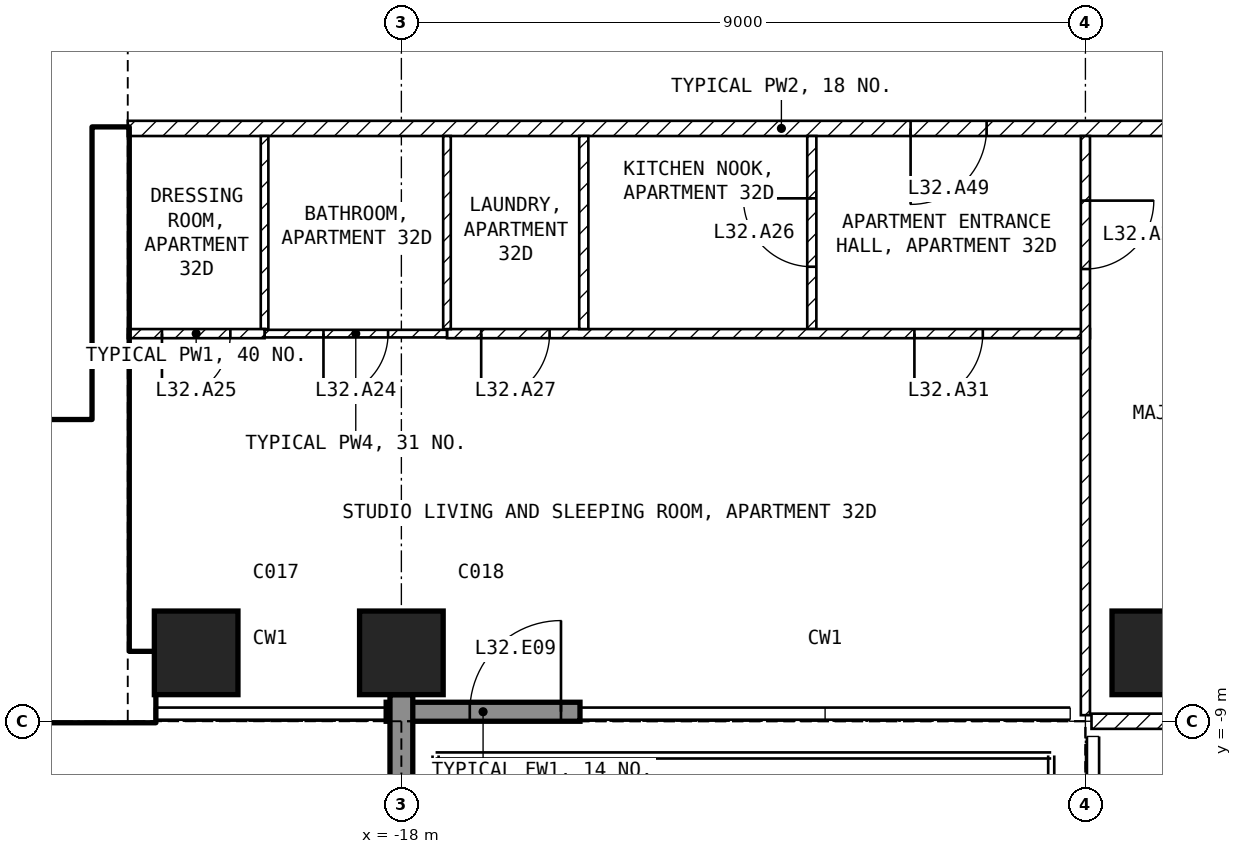
"""IFC4 building model, lengths in metres.
Left out: names, types, materials, properties, quantities, classifications, styles, units other than length and angle.
Written with IfcOpenShell. Run it as: python <this file> out.ifc"""

import sys

from ifc_helpers import new_model, si_unit, direction, frame, frame_2d, origin, origin_2d, place, context, subcontext, project, spatial, rectangle, extrude, element, fill, save


model = new_model("IFC4")
c1 = context("Model", 3, precision=1e-05, world=origin(), true_north=direction((0.0, 1.0)))
c2 = subcontext(c1, "Body", "Model", "MODEL_VIEW")
j1 = project(units=[si_unit("LENGTHUNIT", "METRE"), si_unit("PLANEANGLEUNIT", "RADIAN")], contexts=[c1])
p1 = place(None, origin())
s1 = spatial("IfcSite", under=j1, at=p1, CompositionType="ELEMENT")
p2 = place(p1, origin())
s2 = spatial("IfcBuilding", under=s1, at=p2, CompositionType="ELEMENT")
p3 = place(p2, frame((0.0, 0.0, 133.9)))
s3 = spatial("IfcBuildingStorey", under=s2, at=p3, CompositionType="ELEMENT", Elevation=133.9)
for number, where, z_axis, x_axis in (
    (1, (-20.7, -8.1, -0.25), (0.0, 0.0, 1.0), (1.0, 0.0, 0.0)),
    (2, (-18.0, -8.1, -0.25), (0.0, 0.0, 1.0), (1.0, 0.0, 0.0)),
    (3, (-8.1, -8.1, -0.25), (0.0, 0.0, 1.0), (1.0, 0.0, 0.0)),
):
    element("IfcColumn", number, at=place(p3, frame(where, z_axis=z_axis, x_axis=x_axis)), inside=s3, PredefinedType="COLUMN", context=c2, shape_type="SweptSolid", body=[
        extrude(rectangle(XDim=1.1, YDim=1.1, at=origin_2d()), origin(), (0.0, 0.0, 1.0), 3.5),
    ])
p4 = place(p3, frame((-18.2, -8.875, 0.0), z_axis=(0.0, 0.0, 1.0), x_axis=(1.0, 0.0, 0.0)))
e4 = element("IfcWall", 4, at=p4, inside=s3, PredefinedType="SOLIDWALL", context=c2, shape_type="SweptSolid", body=[
    extrude(rectangle(XDim=2.55, YDim=0.25, at=frame_2d((1.275, 0.0))), origin(), (0.0, 0.0, 1.0), 3.25),
])
p5 = place(p4, frame((1.1, 0.0, 0.0)))
e5 = element("IfcOpeningElement", 5, at=p5, cuts=e4, PredefinedType="OPENING", context=c2, shape_type="SweptSolid", body=[
    extrude(rectangle(XDim=1.2, YDim=2.4, at=frame_2d((0.6, 1.2))), frame((0.0, 0.135, 0.0), z_axis=(0.0, -1.0, 0.0), x_axis=(1.0, 0.0, 0.0)), (0.0, 0.0, 1.0), 0.27),
])
p6 = place(p3, frame((-18.0, -8.65, 0.0), z_axis=(0.0, 0.0, 1.0), x_axis=(0.0, -1.0, 0.0)))
e6 = element("IfcWall", 6, at=p6, inside=s3, PredefinedType="SOLIDWALL", context=c2, shape_type="SweptSolid", body=[
    extrude(rectangle(XDim=3.09, YDim=0.3, at=frame_2d((1.545, 0.0))), origin(), (0.0, 0.0, 1.0), 3.25),
])
p7 = place(p3, frame((-30.2, -8.55, 0.0), z_axis=(0.0, 0.0, 1.0), x_axis=(1.0, 0.0, 0.0)))
e7 = element("IfcWall", 7, at=p7, inside=s3, PredefinedType="SHEAR", context=c2, shape_type="SweptSolid", body=[
    extrude(rectangle(XDim=8.95, YDim=0.9, at=frame_2d((4.475, 0.0))), origin(), (0.0, 0.0, 1.0), 3.25),
])
p8 = place(p3, frame((-21.825, -8.1, 0.0), z_axis=(0.0, 0.0, 1.0), x_axis=(0.0, 1.0, 0.0)))
e8 = element("IfcWall", 8, at=p8, inside=s3, PredefinedType="SHEAR", context=c2, shape_type="SweptSolid", body=[
    extrude(rectangle(XDim=6.9, YDim=0.45, at=frame_2d((3.45, 0.0))), origin(), (0.0, 0.0, 1.0), 3.25),
])
p9 = place(p3, frame((-28.35, -5.15, 0.0), z_axis=(0.0, 0.0, 1.0), x_axis=(1.0, 0.0, 0.0)))
e9 = element("IfcWall", 9, at=p9, inside=s3, PredefinedType="SOLIDWALL", context=c2, shape_type="SweptSolid", body=[
    extrude(rectangle(XDim=6.3, YDim=0.2, at=frame_2d((3.15, 0.0))), origin(), (0.0, 0.0, 1.0), 3.25),
])
p10 = place(p9, frame((5.1, 0.0, 0.0)))
e10 = element("IfcOpeningElement", 10, at=p10, cuts=e9, PredefinedType="OPENING", context=c2, shape_type="SweptSolid", body=[
    extrude(rectangle(XDim=1.0, YDim=2.1, at=frame_2d((0.5, 1.05))), frame((0.0, 0.11, 0.0), z_axis=(0.0, -1.0, 0.0), x_axis=(1.0, 0.0, 0.0)), (0.0, 0.0, 1.0), 0.22),
])
p11 = place(p3, frame((-4.4, -1.2, 0.0), z_axis=(0.0, 0.0, 1.0), x_axis=(-1.0, 0.0, 0.0)))
e11 = element("IfcWall", 11, at=p11, inside=s3, PredefinedType="PARTITIONING", context=c2, shape_type="SweptSolid", body=[
    extrude(rectangle(XDim=17.2, YDim=0.2, at=frame_2d((8.6, 0.0))), origin(), (0.0, 0.0, 1.0), 3.25),
])
p12 = place(p11, frame((5.9, 0.0, 0.0)))
e12 = element("IfcOpeningElement", 12, at=p12, cuts=e11, PredefinedType="OPENING", context=c2, shape_type="SweptSolid", body=[
    extrude(rectangle(XDim=1.0, YDim=2.1, at=frame_2d((0.5, 1.05))), frame((0.0, 0.11, 0.0), z_axis=(0.0, -1.0, 0.0), x_axis=(1.0, 0.0, 0.0)), (0.0, 0.0, 1.0), 0.22),
])
p13 = place(p3, frame((8.92, -9.0, 0.0), z_axis=(0.0, 0.0, 1.0), x_axis=(-1.0, 0.0, 0.0)))
e13 = element("IfcWall", 13, at=p13, inside=s3, PredefinedType="PARTITIONING", context=c2, shape_type="SweptSolid", body=[
    extrude(rectangle(XDim=17.84, YDim=0.2, at=frame_2d((8.92, 0.0))), origin(), (0.0, 0.0, 1.0), 3.25),
])
p14 = place(p13, frame((8.42, 0.0, 0.0)))
e14 = element("IfcOpeningElement", 14, at=p14, cuts=e13, PredefinedType="OPENING", context=c2, shape_type="SweptSolid", body=[
    extrude(rectangle(XDim=1.0, YDim=2.1, at=frame_2d((0.5, 1.05))), frame((0.0, 0.11, 0.0), z_axis=(0.0, -1.0, 0.0), x_axis=(1.0, 0.0, 0.0)), (0.0, 0.0, 1.0), 0.22),
])
p15 = place(p3, frame((-12.6, -3.84, 0.0), z_axis=(0.0, 0.0, 1.0), x_axis=(0.0, 1.0, 0.0)))
e15 = element("IfcWall", 15, at=p15, inside=s3, PredefinedType="PARTITIONING", context=c2, shape_type="SweptSolid", body=[
    extrude(rectangle(XDim=2.54, YDim=0.12, at=frame_2d((1.27, 0.0))), origin(), (0.0, 0.0, 1.0), 3.25),
])
p16 = place(p15, frame((0.82, 0.0, 0.0)))
e16 = element("IfcOpeningElement", 16, at=p16, cuts=e15, PredefinedType="OPENING", context=c2, shape_type="SweptSolid", body=[
    extrude(rectangle(XDim=0.9, YDim=2.1, at=frame_2d((0.45, 1.05))), frame((0.0, 0.07, 0.0), z_axis=(0.0, -1.0, 0.0), x_axis=(1.0, 0.0, 0.0)), (0.0, 0.0, 1.0), 0.14),
])
p17 = place(p3, frame((-8.94, -3.9, 0.0), z_axis=(0.0, 0.0, 1.0), x_axis=(-1.0, 0.0, 0.0)))
e17 = element("IfcWall", 17, at=p17, inside=s3, PredefinedType="PARTITIONING", context=c2, shape_type="SweptSolid", body=[
    extrude(rectangle(XDim=8.46, YDim=0.12, at=frame_2d((4.23, 0.0))), origin(), (0.0, 0.0, 1.0), 3.25),
])
p18 = place(p17, frame((7.11, 0.0, 0.0)))
e18 = element("IfcOpeningElement", 18, at=p18, cuts=e17, PredefinedType="OPENING", context=c2, shape_type="SweptSolid", body=[
    extrude(rectangle(XDim=0.9, YDim=2.1, at=frame_2d((0.45, 1.05))), frame((0.0, 0.07, 0.0), z_axis=(0.0, -1.0, 0.0), x_axis=(1.0, 0.0, 0.0)), (0.0, 0.0, 1.0), 0.14),
])
p19 = place(p17, frame((1.41, 0.0, 0.0)))
e19 = element("IfcOpeningElement", 19, at=p19, cuts=e17, PredefinedType="OPENING", context=c2, shape_type="SweptSolid", body=[
    extrude(rectangle(XDim=0.9, YDim=2.1, at=frame_2d((0.45, 1.05))), frame((0.0, 0.07, 0.0), z_axis=(0.0, -1.0, 0.0), x_axis=(1.0, 0.0, 0.0)), (0.0, 0.0, 1.0), 0.14),
])
p20 = place(p3, frame((-9.0, -1.3, 0.0), z_axis=(0.0, 0.0, 1.0), x_axis=(0.0, -1.0, 0.0)))
e20 = element("IfcWall", 20, at=p20, inside=s3, PredefinedType="PARTITIONING", context=c2, shape_type="SweptSolid", body=[
    extrude(rectangle(XDim=7.62, YDim=0.12, at=frame_2d((3.81, 0.0))), origin(), (0.0, 0.0, 1.0), 3.25),
])
p21 = place(p20, frame((0.85, 0.0, 0.0)))
e21 = element("IfcOpeningElement", 21, at=p21, cuts=e20, PredefinedType="OPENING", context=c2, shape_type="SweptSolid", body=[
    extrude(rectangle(XDim=0.9, YDim=2.1, at=frame_2d((0.45, 1.05))), frame((0.0, 0.07, 0.0), z_axis=(0.0, -1.0, 0.0), x_axis=(1.0, 0.0, 0.0)), (0.0, 0.0, 1.0), 0.14),
])
p22 = place(p3, frame((-15.6, -3.84, 0.0), z_axis=(0.0, 0.0, 1.0), x_axis=(0.0, 1.0, 0.0)))
e22 = element("IfcWall", 22, at=p22, inside=s3, PredefinedType="PARTITIONING", context=c2, shape_type="SweptSolid", body=[
    extrude(rectangle(XDim=2.54, YDim=0.12, at=frame_2d((1.27, 0.0))), origin(), (0.0, 0.0, 1.0), 3.25),
])
for number, where, z_axis, x_axis in (
    (23, (-17.4, -3.84, 0.0), (0.0, 0.0, 1.0), (0.0, 1.0, 0.0)),
    (24, (-19.8, -3.84, 0.0), (0.0, 0.0, 1.0), (0.0, 1.0, 0.0)),
):
    element("IfcWall", number, at=place(p3, frame(where, z_axis=z_axis, x_axis=x_axis)), inside=s3, PredefinedType="PARTITIONING", context=c2, shape_type="SweptSolid", body=[
        extrude(rectangle(XDim=2.54, YDim=0.1, at=frame_2d((1.27, 0.0))), origin(), (0.0, 0.0, 1.0), 3.25),
    ])
p23 = place(p3, frame((-17.4, -3.9, 0.0), z_axis=(0.0, 0.0, 1.0), x_axis=(-1.0, 0.0, 0.0)))
e25 = element("IfcWall", 25, at=p23, inside=s3, PredefinedType="PARTITIONING", context=c2, shape_type="SweptSolid", body=[
    extrude(rectangle(XDim=2.4, YDim=0.1, at=frame_2d((1.2, 0.0))), origin(), (0.0, 0.0, 1.0), 3.25),
])
p24 = place(p23, frame((0.775, 0.0, 0.0)))
e26 = element("IfcOpeningElement", 26, at=p24, cuts=e25, PredefinedType="OPENING", context=c2, shape_type="SweptSolid", body=[
    extrude(rectangle(XDim=0.85, YDim=2.1, at=frame_2d((0.425, 1.05))), frame((0.0, 0.06, 0.0), z_axis=(0.0, -1.0, 0.0), x_axis=(1.0, 0.0, 0.0)), (0.0, 0.0, 1.0), 0.12),
])
p25 = place(p3, frame((-19.8, -3.9, 0.0), z_axis=(0.0, 0.0, 1.0), x_axis=(-1.0, 0.0, 0.0)))
e27 = element("IfcWall", 27, at=p25, inside=s3, PredefinedType="PARTITIONING", context=c2, shape_type="SweptSolid", body=[
    extrude(rectangle(XDim=1.8, YDim=0.12, at=frame_2d((0.9, 0.0))), origin(), (0.0, 0.0, 1.0), 3.25),
])
p26 = place(p25, frame((0.45, 0.0, 0.0)))
e28 = element("IfcOpeningElement", 28, at=p26, cuts=e27, PredefinedType="OPENING", context=c2, shape_type="SweptSolid", body=[
    extrude(rectangle(XDim=0.9, YDim=2.1, at=frame_2d((0.45, 1.05))), frame((0.0, 0.07, 0.0), z_axis=(0.0, -1.0, 0.0), x_axis=(1.0, 0.0, 0.0)), (0.0, 0.0, 1.0), 0.14),
])
p27 = place(p5, origin())
e29 = element("IfcDoor", 29, at=p27, inside=s3, OperationType="SINGLE_SWING_RIGHT", PredefinedType="DOOR", context=c2, shape_type="SweptSolid", body=[
    extrude(rectangle(XDim=1.2, YDim=2.4, at=frame_2d((0.6, 1.2))), frame((0.0, 0.025, 0.0), z_axis=(0.0, -1.0, 0.0), x_axis=(1.0, 0.0, 0.0)), (0.0, 0.0, 1.0), 0.05),
])
fill(e5, e29)
p28 = place(p10, origin())
e30 = element("IfcDoor", 30, at=p28, inside=s3, OperationType="SINGLE_SWING_LEFT", PredefinedType="DOOR", context=c2, shape_type="SweptSolid", body=[
    extrude(rectangle(XDim=1.0, YDim=2.1, at=frame_2d((0.5, 1.05))), frame((0.0, 0.025, 0.0), z_axis=(0.0, -1.0, 0.0), x_axis=(1.0, 0.0, 0.0)), (0.0, 0.0, 1.0), 0.05),
])
fill(e10, e30)
p29 = place(p24, origin())
e31 = element("IfcDoor", 31, at=p29, inside=s3, OperationType="SINGLE_SWING_RIGHT", PredefinedType="DOOR", context=c2, shape_type="SweptSolid", body=[
    extrude(rectangle(XDim=0.85, YDim=2.1, at=frame_2d((0.425, 1.05))), frame((0.0, 0.025, 0.0), z_axis=(0.0, -1.0, 0.0), x_axis=(1.0, 0.0, 0.0)), (0.0, 0.0, 1.0), 0.05),
])
fill(e26, e31)
p30 = place(p26, origin())
e32 = element("IfcDoor", 32, at=p30, inside=s3, OperationType="SINGLE_SWING_RIGHT", PredefinedType="DOOR", context=c2, shape_type="SweptSolid", body=[
    extrude(rectangle(XDim=0.9, YDim=2.1, at=frame_2d((0.45, 1.05))), frame((0.0, 0.025, 0.0), z_axis=(0.0, -1.0, 0.0), x_axis=(1.0, 0.0, 0.0)), (0.0, 0.0, 1.0), 0.05),
])
fill(e28, e32)
p31 = place(p16, origin())
e33 = element("IfcDoor", 33, at=p31, inside=s3, OperationType="SINGLE_SWING_RIGHT", PredefinedType="DOOR", context=c2, shape_type="SweptSolid", body=[
    extrude(rectangle(XDim=0.9, YDim=2.1, at=frame_2d((0.45, 1.05))), frame((0.0, 0.025, 0.0), z_axis=(0.0, -1.0, 0.0), x_axis=(1.0, 0.0, 0.0)), (0.0, 0.0, 1.0), 0.05),
])
fill(e16, e33)
p32 = place(p18, origin())
e34 = element("IfcDoor", 34, at=p32, inside=s3, OperationType="SINGLE_SWING_RIGHT", PredefinedType="DOOR", context=c2, shape_type="SweptSolid", body=[
    extrude(rectangle(XDim=0.9, YDim=2.1, at=frame_2d((0.45, 1.05))), frame((0.0, 0.025, 0.0), z_axis=(0.0, -1.0, 0.0), x_axis=(1.0, 0.0, 0.0)), (0.0, 0.0, 1.0), 0.05),
])
fill(e18, e34)
p33 = place(p21, origin())
e35 = element("IfcDoor", 35, at=p33, inside=s3, OperationType="SINGLE_SWING_LEFT", PredefinedType="DOOR", context=c2, shape_type="SweptSolid", body=[
    extrude(rectangle(XDim=0.9, YDim=2.1, at=frame_2d((0.45, 1.05))), frame((0.0, 0.025, 0.0), z_axis=(0.0, -1.0, 0.0), x_axis=(1.0, 0.0, 0.0)), (0.0, 0.0, 1.0), 0.05),
])
fill(e21, e35)
p34 = place(p19, origin())
e36 = element("IfcDoor", 36, at=p34, inside=s3, OperationType="SINGLE_SWING_RIGHT", PredefinedType="DOOR", context=c2, shape_type="SweptSolid", body=[
    extrude(rectangle(XDim=0.9, YDim=2.1, at=frame_2d((0.45, 1.05))), frame((0.0, 0.025, 0.0), z_axis=(0.0, -1.0, 0.0), x_axis=(1.0, 0.0, 0.0)), (0.0, 0.0, 1.0), 0.05),
])
fill(e19, e36)
p35 = place(p12, origin())
e37 = element("IfcDoor", 37, at=p35, inside=s3, OperationType="SINGLE_SWING_RIGHT", PredefinedType="DOOR", context=c2, shape_type="SweptSolid", body=[
    extrude(rectangle(XDim=1.0, YDim=2.1, at=frame_2d((0.5, 1.05))), frame((0.0, 0.025, 0.0), z_axis=(0.0, -1.0, 0.0), x_axis=(1.0, 0.0, 0.0)), (0.0, 0.0, 1.0), 0.05),
])
fill(e12, e37)
save(model, sys.argv[1])
